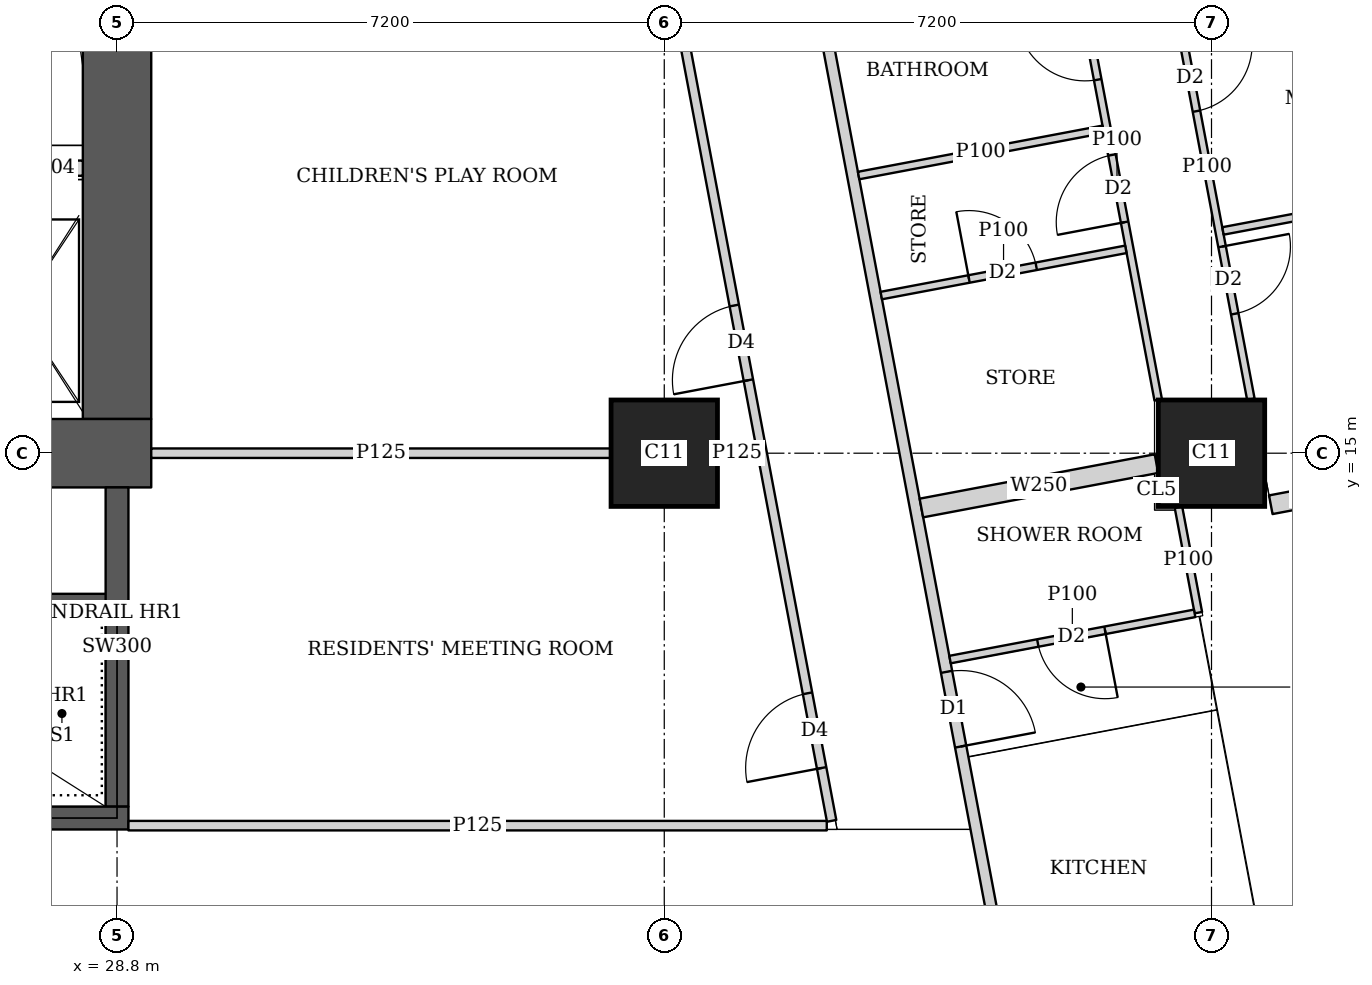
"""IFC4 building model, lengths in metres.
Left out: names, types, materials, properties, quantities, classifications, styles, units other than length and angle.
Written with IfcOpenShell. Run it as: python <this file> out.ifc"""

import sys

from ifc_helpers import new_model, si_unit, direction, frame, frame_2d, origin, origin_2d, place, context, subcontext, project, spatial, rectangle, extrude, element, fill, save


model = new_model("IFC4")
c1 = context("Model", 3, precision=1e-05, world=origin(), true_north=direction((0.0, 1.0)))
c2 = subcontext(c1, "Body", "Model", "MODEL_VIEW")
j1 = project(units=[si_unit("LENGTHUNIT", "METRE"), si_unit("PLANEANGLEUNIT", "RADIAN")], contexts=[c1])
p1 = place(None, origin())
s1 = spatial("IfcSite", under=j1, at=p1, CompositionType="ELEMENT")
p2 = place(p1, origin())
s2 = spatial("IfcBuilding", under=s1, at=p2, CompositionType="ELEMENT")
p3 = place(p2, frame((0.0, 0.0, 266.6)))
s3 = spatial("IfcBuildingStorey", under=s2, at=p3, CompositionType="ELEMENT", Elevation=266.6)
for number, where, z_axis, x_axis in (
    (1, (36.0, 15.0, 0.0), (0.0, 0.0, 1.0), (1.0, 0.0, 0.0)),
    (2, (43.2, 15.0, 0.0), (0.0, 0.0, 1.0), (1.0, 0.0, 0.0)),
):
    element("IfcColumn", number, at=place(p3, frame(where, z_axis=z_axis, x_axis=x_axis)), inside=s3, PredefinedType="COLUMN", context=c2, shape_type="SweptSolid", body=[
        extrude(rectangle(XDim=1.4, YDim=1.4, at=origin_2d()), origin(), (0.0, 0.0, 1.0), 3.75),
    ])
p4 = place(p3, frame((13.95, 15.0, 0.0), z_axis=(0.0, 0.0, 1.0), x_axis=(1.0, 0.0, 0.0)))
e3 = element("IfcWall", 3, at=p4, inside=s3, PredefinedType="SHEAR", context=c2, shape_type="SweptSolid", body=[
    extrude(rectangle(XDim=15.3, YDim=0.9, at=frame_2d((7.65, 0.0))), origin(), (0.0, 0.0, 1.0), 3.75),
])
p5 = place(p4, frame((4.45, 0.0, 0.0)))
e4 = element("IfcOpeningElement", 4, at=p5, cuts=e3, PredefinedType="OPENING", context=c2, shape_type="SweptSolid", body=[
    extrude(rectangle(XDim=1.8, YDim=2.1, at=frame_2d((0.9, 1.05))), frame((0.0, 0.46, 0.0), z_axis=(0.0, -1.0, 0.0), x_axis=(1.0, 0.0, 0.0)), (0.0, 0.0, 1.0), 0.92),
])
p6 = place(p4, frame((10.7, 0.0, 0.0)))
e5 = element("IfcOpeningElement", 5, at=p6, cuts=e3, PredefinedType="OPENING", context=c2, shape_type="SweptSolid", body=[
    extrude(rectangle(XDim=1.1, YDim=2.1, at=frame_2d((0.55, 1.05))), frame((0.0, 0.46, 0.0), z_axis=(0.0, -1.0, 0.0), x_axis=(1.0, 0.0, 0.0)), (0.0, 0.0, 1.0), 0.92),
])
p7 = place(p3, frame((28.8, 15.45, 0.0), z_axis=(0.0, 0.0, 1.0), x_axis=(0.0, 1.0, 0.0)))
e6 = element("IfcWall", 6, at=p7, inside=s3, PredefinedType="SHEAR", context=c2, shape_type="SweptSolid", body=[
    extrude(rectangle(XDim=14.1, YDim=0.9, at=frame_2d((7.05, 0.0))), origin(), (0.0, 0.0, 1.0), 3.75),
])
p8 = place(p3, frame((21.45, 10.2, 0.0), z_axis=(0.0, 0.0, 1.0), x_axis=(1.0, 0.0, 0.0)))
e7 = element("IfcWall", 7, at=p8, inside=s3, PredefinedType="SHEAR", context=c2, shape_type="SweptSolid", body=[
    extrude(rectangle(XDim=7.5, YDim=0.3, at=frame_2d((3.75, 0.0))), origin(), (0.0, 0.0, 1.0), 3.75),
])
p9 = place(p8, frame((1.2, 0.0, 0.0)))
e8 = element("IfcOpeningElement", 8, at=p9, cuts=e7, PredefinedType="OPENING", context=c2, shape_type="SweptSolid", body=[
    extrude(rectangle(XDim=1.1, YDim=2.1, at=frame_2d((0.55, 1.05))), frame((0.0, 0.16, 0.0), z_axis=(0.0, -1.0, 0.0), x_axis=(1.0, 0.0, 0.0)), (0.0, 0.0, 1.0), 0.32),
])
p10 = place(p3, frame((28.8, 10.35, 0.0), z_axis=(0.0, 0.0, 1.0), x_axis=(0.0, 1.0, 0.0)))
e9 = element("IfcWall", 9, at=p10, inside=s3, PredefinedType="SHEAR", context=c2, shape_type="SweptSolid", body=[
    extrude(rectangle(XDim=4.2, YDim=0.3, at=frame_2d((2.1, 0.0))), origin(), (0.0, 0.0, 1.0), 3.75),
])
p11 = place(p3, frame((49.684, 7.832, 0.0), z_axis=(0.0, 0.0, 1.0), x_axis=(-0.185616669694, 0.982622232565, 0.0)))
e10 = element("IfcWall", 10, at=p11, inside=s3, PredefinedType="SOLIDWALL", context=c2, shape_type="SweptSolid", body=[
    extrude(rectangle(XDim=36.0, YDim=0.2, at=frame_2d((18.0, 0.0))), origin(), (0.0, 0.0, 1.0), 3.5),
])
p12 = place(p11, frame((2.518, 0.0, 0.9)))
e11 = element("IfcOpeningElement", 11, at=p12, cuts=e10, PredefinedType="OPENING", context=c2, shape_type="SweptSolid", body=[
    extrude(rectangle(XDim=2.4, YDim=1.5, at=frame_2d((1.2, 0.75))), frame((0.0, 0.11, 0.0), z_axis=(0.0, -1.0, 0.0), x_axis=(1.0, 0.0, 0.0)), (0.0, 0.0, 1.0), 0.22),
])
p13 = place(p11, frame((8.444, 0.0, 0.9)))
e12 = element("IfcOpeningElement", 12, at=p13, cuts=e10, PredefinedType="OPENING", context=c2, shape_type="SweptSolid", body=[
    extrude(rectangle(XDim=1.8, YDim=1.5, at=frame_2d((0.9, 0.75))), frame((0.0, 0.11, 0.0), z_axis=(0.0, -1.0, 0.0), x_axis=(1.0, 0.0, 0.0)), (0.0, 0.0, 1.0), 0.22),
])
p14 = place(p11, frame((12.261, 0.0, 0.9)))
e13 = element("IfcOpeningElement", 13, at=p14, cuts=e10, PredefinedType="OPENING", context=c2, shape_type="SweptSolid", body=[
    extrude(rectangle(XDim=1.8, YDim=1.5, at=frame_2d((0.9, 0.75))), frame((0.0, 0.11, 0.0), z_axis=(0.0, -1.0, 0.0), x_axis=(1.0, 0.0, 0.0)), (0.0, 0.0, 1.0), 0.22),
])
p15 = place(p11, frame((16.078, 0.0, 0.9)))
e14 = element("IfcOpeningElement", 14, at=p15, cuts=e10, PredefinedType="OPENING", context=c2, shape_type="SweptSolid", body=[
    extrude(rectangle(XDim=1.8, YDim=1.5, at=frame_2d((0.9, 0.75))), frame((0.0, 0.11, 0.0), z_axis=(0.0, -1.0, 0.0), x_axis=(1.0, 0.0, 0.0)), (0.0, 0.0, 1.0), 0.22),
])
p16 = place(p11, frame((19.894, 0.0, 0.9)))
e15 = element("IfcOpeningElement", 15, at=p16, cuts=e10, PredefinedType="OPENING", context=c2, shape_type="SweptSolid", body=[
    extrude(rectangle(XDim=1.8, YDim=1.5, at=frame_2d((0.9, 0.75))), frame((0.0, 0.11, 0.0), z_axis=(0.0, -1.0, 0.0), x_axis=(1.0, 0.0, 0.0)), (0.0, 0.0, 1.0), 0.22),
])
p17 = place(p11, frame((23.71, 0.0, 0.9)))
e16 = element("IfcOpeningElement", 16, at=p17, cuts=e10, PredefinedType="OPENING", context=c2, shape_type="SweptSolid", body=[
    extrude(rectangle(XDim=1.8, YDim=1.5, at=frame_2d((0.9, 0.75))), frame((0.0, 0.11, 0.0), z_axis=(0.0, -1.0, 0.0), x_axis=(1.0, 0.0, 0.0)), (0.0, 0.0, 1.0), 0.22),
])
p18 = place(p11, frame((27.526, 0.0, 0.9)))
e17 = element("IfcOpeningElement", 17, at=p18, cuts=e10, PredefinedType="OPENING", context=c2, shape_type="SweptSolid", body=[
    extrude(rectangle(XDim=1.8, YDim=1.5, at=frame_2d((0.9, 0.75))), frame((0.0, 0.11, 0.0), z_axis=(0.0, -1.0, 0.0), x_axis=(1.0, 0.0, 0.0)), (0.0, 0.0, 1.0), 0.22),
])
p19 = place(p11, frame((32.046, 0.0, 0.9)))
e18 = element("IfcOpeningElement", 18, at=p19, cuts=e10, PredefinedType="OPENING", context=c2, shape_type="SweptSolid", body=[
    extrude(rectangle(XDim=1.8, YDim=1.5, at=frame_2d((0.9, 0.75))), frame((0.0, 0.11, 0.0), z_axis=(0.0, -1.0, 0.0), x_axis=(1.0, 0.0, 0.0)), (0.0, 0.0, 1.0), 0.22),
])
p20 = place(p3, frame((34.036, 42.186, 0.0), z_axis=(0.0, 0.0, 1.0), x_axis=(0.185593518645, -0.9826266055, 0.0)))
e19 = element("IfcWall", 19, at=p20, inside=s3, PredefinedType="SOLIDWALL", context=c2, shape_type="SweptSolid", body=[
    extrude(rectangle(XDim=35.961, YDim=0.15, at=frame_2d((17.98, 0.0))), origin(), (0.0, 0.0, 1.0), 2.5),
])
p21 = place(p20, frame((15.529, 0.0, 0.0)))
e20 = element("IfcOpeningElement", 20, at=p21, cuts=e19, PredefinedType="OPENING", context=c2, shape_type="SweptSolid", body=[
    extrude(rectangle(XDim=1.0, YDim=2.1, at=frame_2d((0.5, 1.05))), frame((0.0, 0.085, 0.0), z_axis=(0.0, -1.0, 0.0), x_axis=(1.0, 0.0, 0.0)), (0.0, 0.0, 1.0), 0.17),
])
p22 = place(p20, frame((19.345, 0.0, 0.0)))
e21 = element("IfcOpeningElement", 21, at=p22, cuts=e19, PredefinedType="OPENING", context=c2, shape_type="SweptSolid", body=[
    extrude(rectangle(XDim=1.0, YDim=2.1, at=frame_2d((0.5, 1.05))), frame((0.0, 0.085, 0.0), z_axis=(0.0, -1.0, 0.0), x_axis=(1.0, 0.0, 0.0)), (0.0, 0.0, 1.0), 0.17),
])
p23 = place(p20, frame((30.594, 0.0, 0.0)))
e22 = element("IfcOpeningElement", 22, at=p23, cuts=e19, PredefinedType="OPENING", context=c2, shape_type="SweptSolid", body=[
    extrude(rectangle(XDim=1.0, YDim=2.1, at=frame_2d((0.5, 1.05))), frame((0.0, 0.085, 0.0), z_axis=(0.0, -1.0, 0.0), x_axis=(1.0, 0.0, 0.0)), (0.0, 0.0, 1.0), 0.17),
])
p24 = place(p3, frame((42.566, 21.809, 0.0), z_axis=(0.0, 0.0, 1.0), x_axis=(0.185613526435, -0.98262282632, 0.0)))
e23 = element("IfcWall", 23, at=p24, inside=s3, PredefinedType="PARTITIONING", context=c2, shape_type="SweptSolid", body=[
    extrude(rectangle(XDim=6.207, YDim=0.1, at=frame_2d((3.104, 0.0))), origin(), (0.0, 0.0, 1.0), 2.5),
])
p25 = place(p24, frame((1.45, 0.0, 0.0)))
e24 = element("IfcOpeningElement", 24, at=p25, cuts=e23, PredefinedType="OPENING", context=c2, shape_type="SweptSolid", body=[
    extrude(rectangle(XDim=0.9, YDim=2.1, at=frame_2d((0.45, 1.05))), frame((0.0, 0.06, 0.0), z_axis=(0.0, -1.0, 0.0), x_axis=(1.0, 0.0, 0.0)), (0.0, 0.0, 1.0), 0.12),
])
p26 = place(p24, frame((4.163, 0.0, 0.0)))
e25 = element("IfcOpeningElement", 25, at=p26, cuts=e23, PredefinedType="OPENING", context=c2, shape_type="SweptSolid", body=[
    extrude(rectangle(XDim=0.9, YDim=2.1, at=frame_2d((0.45, 1.05))), frame((0.0, 0.06, 0.0), z_axis=(0.0, -1.0, 0.0), x_axis=(1.0, 0.0, 0.0)), (0.0, 0.0, 1.0), 0.12),
])
p27 = place(p3, frame((41.414, 21.442, 0.0), z_axis=(0.0, 0.0, 1.0), x_axis=(0.185698675093, -0.982606738257, 0.0)))
e26 = element("IfcWall", 26, at=p27, inside=s3, PredefinedType="PARTITIONING", context=c2, shape_type="SweptSolid", body=[
    extrude(rectangle(XDim=5.843, YDim=0.1, at=frame_2d((2.921, 0.0))), origin(), (0.0, 0.0, 1.0), 3.5),
])
p28 = place(p27, frame((0.655, 0.0, 0.0)))
e27 = element("IfcOpeningElement", 27, at=p28, cuts=e26, PredefinedType="OPENING", context=c2, shape_type="SweptSolid", body=[
    extrude(rectangle(XDim=0.9, YDim=2.1, at=frame_2d((0.45, 1.05))), frame((0.0, 0.06, 0.0), z_axis=(0.0, -1.0, 0.0), x_axis=(1.0, 0.0, 0.0)), (0.0, 0.0, 1.0), 0.12),
])
p29 = place(p27, frame((2.563, 0.0, 0.0)))
e28 = element("IfcOpeningElement", 28, at=p29, cuts=e26, PredefinedType="OPENING", context=c2, shape_type="SweptSolid", body=[
    extrude(rectangle(XDim=0.9, YDim=2.1, at=frame_2d((0.45, 1.05))), frame((0.0, 0.06, 0.0), z_axis=(0.0, -1.0, 0.0), x_axis=(1.0, 0.0, 0.0)), (0.0, 0.0, 1.0), 0.12),
])
p30 = place(p3, frame((47.527, 18.712, 0.0), z_axis=(0.0, 0.0, 1.0), x_axis=(-0.982665405803, -0.185387972203, 0.0)))
e29 = element("IfcWall", 29, at=p30, inside=s3, PredefinedType="PARTITIONING", context=c2, shape_type="SweptSolid", body=[
    extrude(rectangle(XDim=4.25, YDim=0.1, at=frame_2d((2.125, 0.0))), origin(), (0.0, 0.0, 1.0), 2.5),
])
p31 = place(p3, frame((42.073, 17.682, 0.0), z_axis=(0.0, 0.0, 1.0), x_axis=(-0.982620626894, -0.185625169636, 0.0)))
e30 = element("IfcWall", 30, at=p31, inside=s3, PredefinedType="PARTITIONING", context=c2, shape_type="SweptSolid", body=[
    extrude(rectangle(XDim=3.275, YDim=0.1, at=frame_2d((1.637, 0.0))), origin(), (0.0, 0.0, 1.0), 3.5),
])
p32 = place(p31, frame((1.2, 0.0, 0.0)))
e31 = element("IfcOpeningElement", 31, at=p32, cuts=e30, PredefinedType="OPENING", context=c2, shape_type="SweptSolid", body=[
    extrude(rectangle(XDim=0.9, YDim=2.1, at=frame_2d((0.45, 1.05))), frame((0.0, 0.06, 0.0), z_axis=(0.0, -1.0, 0.0), x_axis=(1.0, 0.0, 0.0)), (0.0, 0.0, 1.0), 0.12),
])
p33 = place(p3, frame((41.775, 19.261, 0.0), z_axis=(0.0, 0.0, 1.0), x_axis=(-0.982620626894, -0.185625169636, 0.0)))
e32 = element("IfcWall", 32, at=p33, inside=s3, PredefinedType="PARTITIONING", context=c2, shape_type="SweptSolid", body=[
    extrude(rectangle(XDim=3.275, YDim=0.1, at=frame_2d((1.637, 0.0))), origin(), (0.0, 0.0, 1.0), 3.5),
])
p34 = place(p3, frame((42.765, 14.29, 0.0), z_axis=(0.0, 0.0, 1.0), x_axis=(0.185634589628, -0.982618847333, 0.0)))
e33 = element("IfcWall", 33, at=p34, inside=s3, PredefinedType="PARTITIONING", context=c2, shape_type="SweptSolid", body=[
    extrude(rectangle(XDim=1.413, YDim=0.1, at=frame_2d((0.706, 0.0))), origin(), (0.0, 0.0, 1.0), 3.5),
])
p35 = place(p3, frame((42.978, 12.893, 0.0), z_axis=(0.0, 0.0, 1.0), x_axis=(-0.982607026909, -0.185697147715, 0.0)))
e34 = element("IfcWall", 34, at=p35, inside=s3, PredefinedType="PARTITIONING", context=c2, shape_type="SweptSolid", body=[
    extrude(rectangle(XDim=3.275, YDim=0.1, at=frame_2d((1.637, 0.0))), origin(), (0.0, 0.0, 1.0), 3.5),
])
p36 = place(p35, frame((1.2, 0.0, 0.0)))
e35 = element("IfcOpeningElement", 35, at=p36, cuts=e34, PredefinedType="OPENING", context=c2, shape_type="SweptSolid", body=[
    extrude(rectangle(XDim=0.9, YDim=2.1, at=frame_2d((0.45, 1.05))), frame((0.0, 0.06, 0.0), z_axis=(0.0, -1.0, 0.0), x_axis=(1.0, 0.0, 0.0)), (0.0, 0.0, 1.0), 0.12),
])
p37 = place(p3, frame((45.29, 14.569, 0.0), z_axis=(0.0, 0.0, 1.0), x_axis=(-0.982676759201, -0.185327782391, 0.0)))
e36 = element("IfcWall", 36, at=p37, inside=s3, PredefinedType="SOLIDWALL", context=c2, shape_type="SweptSolid", body=[
    extrude(rectangle(XDim=1.333, YDim=0.25, at=frame_2d((0.667, 0.0))), origin(), (0.0, 0.0, 1.0), 3.5),
])
p38 = place(p3, frame((42.476, 14.863, 0.0), z_axis=(0.0, 0.0, 1.0), x_axis=(-0.982638716117, -0.185529387398, 0.0)))
e37 = element("IfcWall", 37, at=p38, inside=s3, PredefinedType="SOLIDWALL", context=c2, shape_type="SweptSolid", body=[
    extrude(rectangle(XDim=3.148, YDim=0.25, at=frame_2d((1.574, 0.0))), origin(), (0.0, 0.0, 1.0), 3.5),
])
p39 = place(p3, frame((28.95, 10.1, 0.0), z_axis=(0.0, 0.0, 1.0), x_axis=(1.0, 0.0, 0.0)))
e38 = element("IfcWall", 38, at=p39, inside=s3, PredefinedType="PARTITIONING", context=c2, shape_type="SweptSolid", body=[
    extrude(rectangle(XDim=9.188, YDim=0.125, at=frame_2d((4.594, 0.0))), origin(), (0.0, 0.0, 1.0), 3.5),
])
p40 = place(p3, frame((38.202, 10.163, 0.0), z_axis=(0.0, 0.0, 1.0), x_axis=(-0.185610321132, 0.982623431783, 0.0)))
e39 = element("IfcWall", 39, at=p40, inside=s3, PredefinedType="PARTITIONING", context=c2, shape_type="SweptSolid", body=[
    extrude(rectangle(XDim=25.111, YDim=0.125, at=frame_2d((12.556, 0.0))), origin(), (0.0, 0.0, 1.0), 2.5),
])
p41 = place(p40, frame((0.708, 0.0, 0.0)))
e40 = element("IfcOpeningElement", 40, at=p41, cuts=e39, PredefinedType="OPENING", context=c2, shape_type="SweptSolid", body=[
    extrude(rectangle(XDim=1.0, YDim=2.1, at=frame_2d((0.5, 1.05))), frame((0.0, 0.073, 0.0), z_axis=(0.0, -1.0, 0.0), x_axis=(1.0, 0.0, 0.0)), (0.0, 0.0, 1.0), 0.145),
])
p42 = place(p40, frame((5.9, 0.0, 0.0)))
e41 = element("IfcOpeningElement", 41, at=p42, cuts=e39, PredefinedType="OPENING", context=c2, shape_type="SweptSolid", body=[
    extrude(rectangle(XDim=1.0, YDim=2.1, at=frame_2d((0.5, 1.05))), frame((0.0, 0.073, 0.0), z_axis=(0.0, -1.0, 0.0), x_axis=(1.0, 0.0, 0.0)), (0.0, 0.0, 1.0), 0.145),
])
p43 = place(p40, frame((13.378, 0.0, 0.0)))
e42 = element("IfcOpeningElement", 42, at=p43, cuts=e39, PredefinedType="OPENING", context=c2, shape_type="SweptSolid", body=[
    extrude(rectangle(XDim=1.0, YDim=2.1, at=frame_2d((0.5, 1.05))), frame((0.0, 0.073, 0.0), z_axis=(0.0, -1.0, 0.0), x_axis=(1.0, 0.0, 0.0)), (0.0, 0.0, 1.0), 0.145),
])
p44 = place(p40, frame((17.194, 0.0, 0.0)))
e43 = element("IfcOpeningElement", 43, at=p44, cuts=e39, PredefinedType="OPENING", context=c2, shape_type="SweptSolid", body=[
    extrude(rectangle(XDim=1.0, YDim=2.1, at=frame_2d((0.5, 1.05))), frame((0.0, 0.073, 0.0), z_axis=(0.0, -1.0, 0.0), x_axis=(1.0, 0.0, 0.0)), (0.0, 0.0, 1.0), 0.145),
])
p45 = place(p40, frame((21.15, 0.0, 0.0)))
e44 = element("IfcOpeningElement", 44, at=p45, cuts=e39, PredefinedType="OPENING", context=c2, shape_type="SweptSolid", body=[
    extrude(rectangle(XDim=1.0, YDim=2.1, at=frame_2d((0.5, 1.05))), frame((0.0, 0.073, 0.0), z_axis=(0.0, -1.0, 0.0), x_axis=(1.0, 0.0, 0.0)), (0.0, 0.0, 1.0), 0.145),
])
p46 = place(p3, frame((29.25, 15.0, 0.0), z_axis=(0.0, 0.0, 1.0), x_axis=(1.0, 0.0, 0.0)))
e45 = element("IfcWall", 45, at=p46, inside=s3, PredefinedType="PARTITIONING", context=c2, shape_type="SweptSolid", body=[
    extrude(rectangle(XDim=6.049, YDim=0.125, at=frame_2d((3.024, 0.0))), origin(), (0.0, 0.0, 1.0), 3.5),
])
p47 = place(p3, frame((36.701, 15.0, 0.0), z_axis=(0.0, 0.0, 1.0), x_axis=(1.0, 0.0, 0.0)))
e46 = element("IfcWall", 46, at=p47, inside=s3, PredefinedType="PARTITIONING", context=c2, shape_type="SweptSolid", body=[
    extrude(rectangle(XDim=0.512, YDim=0.125, at=frame_2d((0.256, 0.0))), origin(), (0.0, 0.0, 1.0), 3.5),
])
p48 = place(p3, frame((23.0, 13.05, 0.0), z_axis=(0.0, 0.0, 1.0), x_axis=(1.0, 0.0, 0.0)))
e47 = element("IfcWall", 47, at=p48, inside=s3, PredefinedType="SHEAR", context=c2, shape_type="SweptSolid", body=[
    extrude(rectangle(XDim=5.8, YDim=0.2, at=frame_2d((2.9, 0.0))), origin(), (0.0, 0.0, 1.0), 3.75),
])
p49 = place(p3, frame((27.4, 18.75, 0.0), z_axis=(0.0, 0.0, 1.0), x_axis=(1.0, 0.0, 0.0)))
e48 = element("IfcWall", 48, at=p49, inside=s3, PredefinedType="SOLIDWALL", context=c2, shape_type="SweptSolid", body=[
    extrude(rectangle(XDim=0.95, YDim=0.2, at=frame_2d((0.475, 0.0))), origin(), (0.0, 0.0, 1.0), 3.5),
])
p50 = place(p25, origin())
e49 = element("IfcDoor", 49, at=p50, inside=s3, OperationType="SINGLE_SWING_LEFT", PredefinedType="DOOR", context=c2, shape_type="SweptSolid", body=[
    extrude(rectangle(XDim=0.9, YDim=2.1, at=frame_2d((0.45, 1.05))), frame((0.0, 0.025, 0.0), z_axis=(0.0, -1.0, 0.0), x_axis=(1.0, 0.0, 0.0)), (0.0, 0.0, 1.0), 0.05),
])
fill(e24, e49)
p51 = place(p26, origin())
e50 = element("IfcDoor", 50, at=p51, inside=s3, OperationType="SINGLE_SWING_LEFT", PredefinedType="DOOR", context=c2, shape_type="SweptSolid", body=[
    extrude(rectangle(XDim=0.9, YDim=2.1, at=frame_2d((0.45, 1.05))), frame((0.0, 0.025, 0.0), z_axis=(0.0, -1.0, 0.0), x_axis=(1.0, 0.0, 0.0)), (0.0, 0.0, 1.0), 0.05),
])
fill(e25, e50)
p52 = place(p28, origin())
e51 = element("IfcDoor", 51, at=p52, inside=s3, OperationType="SINGLE_SWING_RIGHT", PredefinedType="DOOR", context=c2, shape_type="SweptSolid", body=[
    extrude(rectangle(XDim=0.9, YDim=2.1, at=frame_2d((0.45, 1.05))), frame((0.0, 0.025, 0.0), z_axis=(0.0, -1.0, 0.0), x_axis=(1.0, 0.0, 0.0)), (0.0, 0.0, 1.0), 0.05),
])
fill(e27, e51)
p53 = place(p29, origin())
e52 = element("IfcDoor", 52, at=p53, inside=s3, OperationType="SINGLE_SWING_LEFT", PredefinedType="DOOR", context=c2, shape_type="SweptSolid", body=[
    extrude(rectangle(XDim=0.9, YDim=2.1, at=frame_2d((0.45, 1.05))), frame((0.0, 0.025, 0.0), z_axis=(0.0, -1.0, 0.0), x_axis=(1.0, 0.0, 0.0)), (0.0, 0.0, 1.0), 0.05),
])
fill(e28, e52)
p54 = place(p36, origin())
e53 = element("IfcDoor", 53, at=p54, inside=s3, OperationType="SINGLE_SWING_LEFT", PredefinedType="DOOR", context=c2, shape_type="SweptSolid", body=[
    extrude(rectangle(XDim=0.9, YDim=2.1, at=frame_2d((0.45, 1.05))), frame((0.0, 0.025, 0.0), z_axis=(0.0, -1.0, 0.0), x_axis=(1.0, 0.0, 0.0)), (0.0, 0.0, 1.0), 0.05),
])
fill(e35, e53)
p55 = place(p23, origin())
e54 = element("IfcDoor", 54, at=p55, inside=s3, OperationType="SINGLE_SWING_RIGHT", PredefinedType="DOOR", context=c2, shape_type="SweptSolid", body=[
    extrude(rectangle(XDim=1.0, YDim=2.1, at=frame_2d((0.5, 1.05))), frame((0.0, 0.025, 0.0), z_axis=(0.0, -1.0, 0.0), x_axis=(1.0, 0.0, 0.0)), (0.0, 0.0, 1.0), 0.05),
])
fill(e22, e54)
p56 = place(p32, origin())
e55 = element("IfcDoor", 55, at=p56, inside=s3, OperationType="SINGLE_SWING_LEFT", PredefinedType="DOOR", context=c2, shape_type="SweptSolid", body=[
    extrude(rectangle(XDim=0.9, YDim=2.1, at=frame_2d((0.45, 1.05))), frame((0.0, 0.025, 0.0), z_axis=(0.0, -1.0, 0.0), x_axis=(1.0, 0.0, 0.0)), (0.0, 0.0, 1.0), 0.05),
])
fill(e31, e55)
p57 = place(p41, origin())
e56 = element("IfcDoor", 56, at=p57, inside=s3, OperationType="SINGLE_SWING_LEFT", PredefinedType="DOOR", context=c2, shape_type="SweptSolid", body=[
    extrude(rectangle(XDim=1.0, YDim=2.1, at=frame_2d((0.5, 1.05))), frame((0.0, 0.025, 0.0), z_axis=(0.0, -1.0, 0.0), x_axis=(1.0, 0.0, 0.0)), (0.0, 0.0, 1.0), 0.05),
])
fill(e40, e56)
p58 = place(p42, origin())
e57 = element("IfcDoor", 57, at=p58, inside=s3, OperationType="SINGLE_SWING_LEFT", PredefinedType="DOOR", context=c2, shape_type="SweptSolid", body=[
    extrude(rectangle(XDim=1.0, YDim=2.1, at=frame_2d((0.5, 1.05))), frame((0.0, 0.025, 0.0), z_axis=(0.0, -1.0, 0.0), x_axis=(1.0, 0.0, 0.0)), (0.0, 0.0, 1.0), 0.05),
])
fill(e41, e57)
save(model, sys.argv[1])
